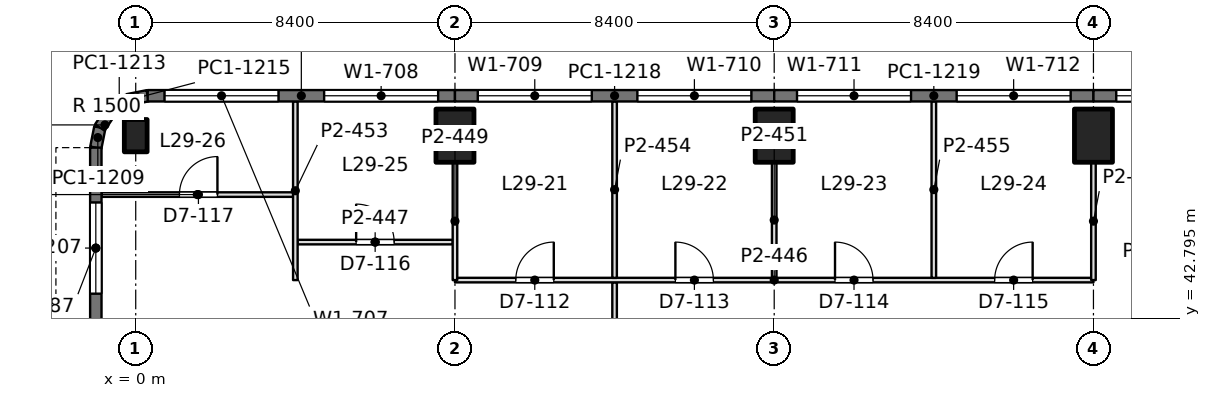
"""IFC4 building model, lengths in metres.
Left out: names, types, materials, properties, quantities, classifications, styles, units other than length and angle.
Written with IfcOpenShell. Run it as: python <this file> out.ifc"""

import sys

from ifc_helpers import new_model, si_unit, direction, frame, frame_2d, origin, origin_2d, place, context, subcontext, project, spatial, rectangle, extrude, element, fill, save


model = new_model("IFC4")
c1 = context("Model", 3, precision=1e-05, world=origin(), true_north=direction((0.0, 1.0)))
c2 = subcontext(c1, "Body", "Model", "MODEL_VIEW")
j1 = project(units=[si_unit("LENGTHUNIT", "METRE"), si_unit("PLANEANGLEUNIT", "RADIAN")], contexts=[c1])
p1 = place(None, origin())
s1 = spatial("IfcSite", under=j1, at=p1, CompositionType="ELEMENT")
p2 = place(p1, origin())
s2 = spatial("IfcBuilding", under=s1, at=p2, CompositionType="ELEMENT")
p3 = place(p2, frame((0.0, 0.0, 130.2)))
s3 = spatial("IfcBuildingStorey", under=s2, at=p3, CompositionType="ELEMENT", Elevation=130.2)
p4 = place(p3, frame((0.0, 47.6, 0.0), z_axis=(0.0, 0.0, 1.0), x_axis=(1.0, 0.0, 0.0)))
e1 = element("IfcColumn", 1, at=p4, inside=s3, PredefinedType="COLUMN", context=c2, shape_type="SweptSolid", body=[
    extrude(rectangle(XDim=0.6, YDim=0.85, at=origin_2d()), origin(), (0.0, 0.0, 1.0), 4.2),
])
for number, where, z_axis, x_axis in (
    (2, (8.4, 47.6, 0.0), (0.0, 0.0, 1.0), (1.0, 0.0, 0.0)),
    (3, (16.8, 47.6, 0.0), (0.0, 0.0, 1.0), (1.0, 0.0, 0.0)),
    (4, (25.2, 47.6, 0.0), (0.0, 0.0, 1.0), (1.0, 0.0, 0.0)),
):
    element("IfcColumn", number, at=place(p3, frame(where, z_axis=z_axis, x_axis=x_axis)), inside=s3, PredefinedType="COLUMN", context=c2, shape_type="SweptSolid", body=[
        extrude(rectangle(XDim=1.0, YDim=1.4, at=origin_2d()), origin(), (0.0, 0.0, 1.0), 4.2),
    ])
p5 = place(p3, frame((-1.05, 42.0, 0.0), z_axis=(0.0, 0.0, 1.0), x_axis=(0.0, 1.0, 0.0)))
e5 = element("IfcWall", 5, at=p5, inside=s3, PredefinedType="SOLIDWALL", context=c2, shape_type="SweptSolid", body=[
    extrude(rectangle(XDim=5.285, YDim=0.3, at=frame_2d((2.643, 0.0))), origin(), (0.0, 0.0, 1.0), 4.05),
])
p6 = place(p5, frame((1.443, 0.0, 0.9)))
e6 = element("IfcOpeningElement", 6, at=p6, cuts=e5, PredefinedType="OPENING", context=c2, shape_type="SweptSolid", body=[
    extrude(rectangle(XDim=2.4, YDim=1.9, at=frame_2d((1.2, 0.95))), frame((0.0, 0.16, 0.0), z_axis=(0.0, -1.0, 0.0), x_axis=(1.0, 0.0, 0.0)), (0.0, 0.0, 1.0), 0.32),
])
p7 = place(p3, frame((-1.05, 47.285, 0.0), z_axis=(0.0, 0.0, 1.0), x_axis=(0.195073962632, 0.980788534345, 0.0)))
e7 = element("IfcWall", 7, at=p7, inside=s3, PredefinedType="SOLIDWALL", context=c2, shape_type="SweptSolid", body=[
    extrude(rectangle(XDim=0.541, YDim=0.3, at=frame_2d((0.271, 0.0))), origin(), (0.0, 0.0, 1.0), 4.05),
])
p8 = place(p3, frame((-0.945, 47.815, 0.0), z_axis=(0.0, 0.0, 1.0), x_axis=(0.55534295404, 0.831621430339, 0.0)))
e8 = element("IfcWall", 8, at=p8, inside=s3, PredefinedType="SOLIDWALL", context=c2, shape_type="SweptSolid", body=[
    extrude(rectangle(XDim=0.526, YDim=0.3, at=frame_2d((0.263, 0.0))), origin(), (0.0, 0.0, 1.0), 4.05),
])
p9 = place(p3, frame((-0.653, 48.253, 0.0), z_axis=(0.0, 0.0, 1.0), x_axis=(0.831692711774, 0.555236195849, 0.0)))
e9 = element("IfcWall", 9, at=p9, inside=s3, PredefinedType="SOLIDWALL", context=c2, shape_type="SweptSolid", body=[
    extrude(rectangle(XDim=0.525, YDim=0.3, at=frame_2d((0.263, 0.0))), origin(), (0.0, 0.0, 1.0), 4.05),
])
p10 = place(p3, frame((-0.216, 48.544, 0.0), z_axis=(0.0, 0.0, 1.0), x_axis=(0.980788534345, 0.195073962632, 0.0)))
e10 = element("IfcWall", 10, at=p10, inside=s3, PredefinedType="SOLIDWALL", context=c2, shape_type="SweptSolid", body=[
    extrude(rectangle(XDim=0.541, YDim=0.3, at=frame_2d((0.271, 0.0))), origin(), (0.0, 0.0, 1.0), 4.05),
])
p11 = place(p3, frame((0.315, 48.65, 0.0), z_axis=(0.0, 0.0, 1.0), x_axis=(1.0, 0.0, 0.0)))
e11 = element("IfcWall", 11, at=p11, inside=s3, PredefinedType="SOLIDWALL", context=c2, shape_type="SweptSolid", body=[
    extrude(rectangle(XDim=8.085, YDim=0.3, at=frame_2d((4.042, 0.0))), origin(), (0.0, 0.0, 1.0), 4.05),
])
p12 = place(p11, frame((0.443, 0.0, 0.9)))
e12 = element("IfcOpeningElement", 12, at=p12, cuts=e11, PredefinedType="OPENING", context=c2, shape_type="SweptSolid", body=[
    extrude(rectangle(XDim=3.0, YDim=1.9, at=frame_2d((1.5, 0.95))), frame((0.0, 0.16, 0.0), z_axis=(0.0, -1.0, 0.0), x_axis=(1.0, 0.0, 0.0)), (0.0, 0.0, 1.0), 0.32),
])
p13 = place(p11, frame((4.643, 0.0, 0.9)))
e13 = element("IfcOpeningElement", 13, at=p13, cuts=e11, PredefinedType="OPENING", context=c2, shape_type="SweptSolid", body=[
    extrude(rectangle(XDim=3.0, YDim=1.9, at=frame_2d((1.5, 0.95))), frame((0.0, 0.16, 0.0), z_axis=(0.0, -1.0, 0.0), x_axis=(1.0, 0.0, 0.0)), (0.0, 0.0, 1.0), 0.32),
])
p14 = place(p3, frame((8.4, 48.65, 0.0), z_axis=(0.0, 0.0, 1.0), x_axis=(1.0, 0.0, 0.0)))
e14 = element("IfcWall", 14, at=p14, inside=s3, PredefinedType="SOLIDWALL", context=c2, shape_type="SweptSolid", body=[
    extrude(rectangle(XDim=8.4, YDim=0.3, at=frame_2d((4.2, 0.0))), origin(), (0.0, 0.0, 1.0), 4.05),
])
p15 = place(p14, frame((0.6, 0.0, 0.9)))
e15 = element("IfcOpeningElement", 15, at=p15, cuts=e14, PredefinedType="OPENING", context=c2, shape_type="SweptSolid", body=[
    extrude(rectangle(XDim=3.0, YDim=1.9, at=frame_2d((1.5, 0.95))), frame((0.0, 0.16, 0.0), z_axis=(0.0, -1.0, 0.0), x_axis=(1.0, 0.0, 0.0)), (0.0, 0.0, 1.0), 0.32),
])
p16 = place(p14, frame((4.8, 0.0, 0.9)))
e16 = element("IfcOpeningElement", 16, at=p16, cuts=e14, PredefinedType="OPENING", context=c2, shape_type="SweptSolid", body=[
    extrude(rectangle(XDim=3.0, YDim=1.9, at=frame_2d((1.5, 0.95))), frame((0.0, 0.16, 0.0), z_axis=(0.0, -1.0, 0.0), x_axis=(1.0, 0.0, 0.0)), (0.0, 0.0, 1.0), 0.32),
])
p17 = place(p3, frame((16.8, 48.65, 0.0), z_axis=(0.0, 0.0, 1.0), x_axis=(1.0, 0.0, 0.0)))
e17 = element("IfcWall", 17, at=p17, inside=s3, PredefinedType="SOLIDWALL", context=c2, shape_type="SweptSolid", body=[
    extrude(rectangle(XDim=8.4, YDim=0.3, at=frame_2d((4.2, 0.0))), origin(), (0.0, 0.0, 1.0), 4.05),
])
p18 = place(p17, frame((0.6, 0.0, 0.9)))
e18 = element("IfcOpeningElement", 18, at=p18, cuts=e17, PredefinedType="OPENING", context=c2, shape_type="SweptSolid", body=[
    extrude(rectangle(XDim=3.0, YDim=1.9, at=frame_2d((1.5, 0.95))), frame((0.0, 0.16, 0.0), z_axis=(0.0, -1.0, 0.0), x_axis=(1.0, 0.0, 0.0)), (0.0, 0.0, 1.0), 0.32),
])
p19 = place(p17, frame((4.8, 0.0, 0.9)))
e19 = element("IfcOpeningElement", 19, at=p19, cuts=e17, PredefinedType="OPENING", context=c2, shape_type="SweptSolid", body=[
    extrude(rectangle(XDim=3.0, YDim=1.9, at=frame_2d((1.5, 0.95))), frame((0.0, 0.16, 0.0), z_axis=(0.0, -1.0, 0.0), x_axis=(1.0, 0.0, 0.0)), (0.0, 0.0, 1.0), 0.32),
])
p20 = place(p3, frame((25.2, 48.65, 0.0), z_axis=(0.0, 0.0, 1.0), x_axis=(1.0, 0.0, 0.0)))
e20 = element("IfcWall", 20, at=p20, inside=s3, PredefinedType="SOLIDWALL", context=c2, shape_type="SweptSolid", body=[
    extrude(rectangle(XDim=8.4, YDim=0.3, at=frame_2d((4.2, 0.0))), origin(), (0.0, 0.0, 1.0), 4.05),
])
p21 = place(p20, frame((0.6, 0.0, 0.9)))
e21 = element("IfcOpeningElement", 21, at=p21, cuts=e20, PredefinedType="OPENING", context=c2, shape_type="SweptSolid", body=[
    extrude(rectangle(XDim=3.0, YDim=1.9, at=frame_2d((1.5, 0.95))), frame((0.0, 0.16, 0.0), z_axis=(0.0, -1.0, 0.0), x_axis=(1.0, 0.0, 0.0)), (0.0, 0.0, 1.0), 0.32),
])
p22 = place(p20, frame((4.8, 0.0, 0.9)))
e22 = element("IfcOpeningElement", 22, at=p22, cuts=e20, PredefinedType="OPENING", context=c2, shape_type="SweptSolid", body=[
    extrude(rectangle(XDim=3.0, YDim=1.9, at=frame_2d((1.5, 0.95))), frame((0.0, 0.16, 0.0), z_axis=(0.0, -1.0, 0.0), x_axis=(1.0, 0.0, 0.0)), (0.0, 0.0, 1.0), 0.32),
])
p23 = place(p3, frame((-0.902, 46.05, 0.0), z_axis=(0.0, 0.0, 1.0), x_axis=(1.0, 0.0, 0.0)))
e23 = element("IfcWall", 23, at=p23, inside=s3, PredefinedType="PARTITIONING", context=c2, shape_type="SweptSolid", body=[
    extrude(rectangle(XDim=5.044, YDim=0.12, at=frame_2d((2.522, 0.0))), origin(), (0.0, 0.0, 1.0), 3.56),
])
p24 = place(p23, frame((2.052, 0.0, 0.0)))
e24 = element("IfcOpeningElement", 24, at=p24, cuts=e23, PredefinedType="OPENING", context=c2, shape_type="SweptSolid", body=[
    extrude(rectangle(XDim=1.0, YDim=2.4, at=frame_2d((0.5, 1.2))), frame((0.0, 0.07, 0.0), z_axis=(0.0, -1.0, 0.0), x_axis=(1.0, 0.0, 0.0)), (0.0, 0.0, 1.0), 0.14),
])
p25 = place(p3, frame((4.258, 44.8, 0.0), z_axis=(0.0, 0.0, 1.0), x_axis=(1.0, 0.0, 0.0)))
e25 = element("IfcWall", 25, at=p25, inside=s3, PredefinedType="PARTITIONING", context=c2, shape_type="SweptSolid", body=[
    extrude(rectangle(XDim=4.084, YDim=0.12, at=frame_2d((2.042, 0.0))), origin(), (0.0, 0.0, 1.0), 3.55),
])
p26 = place(p25, frame((1.542, 0.0, 0.0)))
e26 = element("IfcOpeningElement", 26, at=p26, cuts=e25, PredefinedType="OPENING", context=c2, shape_type="SweptSolid", body=[
    extrude(rectangle(XDim=1.0, YDim=2.4, at=frame_2d((0.5, 1.2))), frame((0.0, 0.07, 0.0), z_axis=(0.0, -1.0, 0.0), x_axis=(1.0, 0.0, 0.0)), (0.0, 0.0, 1.0), 0.14),
])
p27 = place(p3, frame((8.4, 43.8, 0.0), z_axis=(0.0, 0.0, 1.0), x_axis=(1.0, 0.0, 0.0)))
e27 = element("IfcWall", 27, at=p27, inside=s3, PredefinedType="PARTITIONING", context=c2, shape_type="SweptSolid", body=[
    extrude(rectangle(XDim=16.8, YDim=0.12, at=frame_2d((8.4, 0.0))), origin(), (0.0, 0.0, 1.0), 3.55),
])
p28 = place(p27, frame((1.6, 0.0, 0.0)))
e28 = element("IfcOpeningElement", 28, at=p28, cuts=e27, PredefinedType="OPENING", context=c2, shape_type="SweptSolid", body=[
    extrude(rectangle(XDim=1.0, YDim=2.4, at=frame_2d((0.5, 1.2))), frame((0.0, 0.07, 0.0), z_axis=(0.0, -1.0, 0.0), x_axis=(1.0, 0.0, 0.0)), (0.0, 0.0, 1.0), 0.14),
])
p29 = place(p27, frame((5.8, 0.0, 0.0)))
e29 = element("IfcOpeningElement", 29, at=p29, cuts=e27, PredefinedType="OPENING", context=c2, shape_type="SweptSolid", body=[
    extrude(rectangle(XDim=1.0, YDim=2.4, at=frame_2d((0.5, 1.2))), frame((0.0, 0.07, 0.0), z_axis=(0.0, -1.0, 0.0), x_axis=(1.0, 0.0, 0.0)), (0.0, 0.0, 1.0), 0.14),
])
p30 = place(p27, frame((10.0, 0.0, 0.0)))
e30 = element("IfcOpeningElement", 30, at=p30, cuts=e27, PredefinedType="OPENING", context=c2, shape_type="SweptSolid", body=[
    extrude(rectangle(XDim=1.0, YDim=2.4, at=frame_2d((0.5, 1.2))), frame((0.0, 0.07, 0.0), z_axis=(0.0, -1.0, 0.0), x_axis=(1.0, 0.0, 0.0)), (0.0, 0.0, 1.0), 0.14),
])
p31 = place(p27, frame((14.2, 0.0, 0.0)))
e31 = element("IfcOpeningElement", 31, at=p31, cuts=e27, PredefinedType="OPENING", context=c2, shape_type="SweptSolid", body=[
    extrude(rectangle(XDim=1.0, YDim=2.4, at=frame_2d((0.5, 1.2))), frame((0.0, 0.07, 0.0), z_axis=(0.0, -1.0, 0.0), x_axis=(1.0, 0.0, 0.0)), (0.0, 0.0, 1.0), 0.14),
])
p32 = place(p3, frame((4.2, 43.8, 0.0), z_axis=(0.0, 0.0, 1.0), x_axis=(0.0, 1.0, 0.0)))
e32 = element("IfcWall", 32, at=p32, inside=s3, PredefinedType="PARTITIONING", context=c2, shape_type="SweptSolid", body=[
    extrude(rectangle(XDim=4.702, YDim=0.12, at=frame_2d((2.351, 0.0))), origin(), (0.0, 0.0, 1.0), 3.56),
])
p33 = place(p3, frame((8.4, 43.8, 0.0), z_axis=(0.0, 0.0, 1.0), x_axis=(0.0, 1.0, 0.0)))
e33 = element("IfcWall", 33, at=p33, inside=s3, PredefinedType="PARTITIONING", context=c2, shape_type="SweptSolid", body=[
    extrude(rectangle(XDim=3.101, YDim=0.12, at=frame_2d((1.55, 0.0))), origin(), (0.0, 0.0, 1.0), 3.55),
])
p34 = place(p3, frame((12.6, 43.858, 0.0), z_axis=(0.0, 0.0, 1.0), x_axis=(0.0, 1.0, 0.0)))
e34 = element("IfcWall", 34, at=p34, inside=s3, PredefinedType="PARTITIONING", context=c2, shape_type="SweptSolid", body=[
    extrude(rectangle(XDim=4.644, YDim=0.12, at=frame_2d((2.322, 0.0))), origin(), (0.0, 0.0, 1.0), 3.56),
])
p35 = place(p3, frame((16.8, 43.858, 0.0), z_axis=(0.0, 0.0, 1.0), x_axis=(0.0, 1.0, 0.0)))
e35 = element("IfcWall", 35, at=p35, inside=s3, PredefinedType="PARTITIONING", context=c2, shape_type="SweptSolid", body=[
    extrude(rectangle(XDim=3.043, YDim=0.12, at=frame_2d((1.521, 0.0))), origin(), (0.0, 0.0, 1.0), 3.55),
])
p36 = place(p3, frame((21.0, 43.858, 0.0), z_axis=(0.0, 0.0, 1.0), x_axis=(0.0, 1.0, 0.0)))
e36 = element("IfcWall", 36, at=p36, inside=s3, PredefinedType="PARTITIONING", context=c2, shape_type="SweptSolid", body=[
    extrude(rectangle(XDim=4.644, YDim=0.12, at=frame_2d((2.322, 0.0))), origin(), (0.0, 0.0, 1.0), 3.56),
])
p37 = place(p3, frame((25.2, 43.8, 0.0), z_axis=(0.0, 0.0, 1.0), x_axis=(0.0, 1.0, 0.0)))
e37 = element("IfcWall", 37, at=p37, inside=s3, PredefinedType="PARTITIONING", context=c2, shape_type="SweptSolid", body=[
    extrude(rectangle(XDim=3.101, YDim=0.12, at=frame_2d((1.55, 0.0))), origin(), (0.0, 0.0, 1.0), 3.55),
])
p38 = place(p3, frame((12.6, 39.858, 0.0), z_axis=(0.0, 0.0, 1.0), x_axis=(0.0, 1.0, 0.0)))
e38 = element("IfcWall", 38, at=p38, inside=s3, PredefinedType="PARTITIONING", context=c2, shape_type="SweptSolid", body=[
    extrude(rectangle(XDim=3.884, YDim=0.12, at=frame_2d((1.942, 0.0))), origin(), (0.0, 0.0, 1.0), 3.55),
])
p39 = place(p6, origin())
e39 = element("IfcWindow", 39, at=p39, inside=s3, PartitioningType="SINGLE_PANEL", PredefinedType="WINDOW", context=c2, shape_type="SweptSolid", body=[
    extrude(rectangle(XDim=2.4, YDim=1.9, at=frame_2d((1.2, 0.95))), frame((0.0, 0.03, 0.0), z_axis=(0.0, -1.0, 0.0), x_axis=(1.0, 0.0, 0.0)), (0.0, 0.0, 1.0), 0.06),
])
fill(e6, e39)
p40 = place(p12, origin())
e40 = element("IfcWindow", 40, at=p40, inside=s3, PartitioningType="SINGLE_PANEL", PredefinedType="WINDOW", context=c2, shape_type="SweptSolid", body=[
    extrude(rectangle(XDim=3.0, YDim=1.9, at=frame_2d((1.5, 0.95))), frame((0.0, 0.03, 0.0), z_axis=(0.0, -1.0, 0.0), x_axis=(1.0, 0.0, 0.0)), (0.0, 0.0, 1.0), 0.06),
])
fill(e12, e40)
p41 = place(p13, origin())
e41 = element("IfcWindow", 41, at=p41, inside=s3, PartitioningType="SINGLE_PANEL", PredefinedType="WINDOW", context=c2, shape_type="SweptSolid", body=[
    extrude(rectangle(XDim=3.0, YDim=1.9, at=frame_2d((1.5, 0.95))), frame((0.0, 0.03, 0.0), z_axis=(0.0, -1.0, 0.0), x_axis=(1.0, 0.0, 0.0)), (0.0, 0.0, 1.0), 0.06),
])
fill(e13, e41)
p42 = place(p15, origin())
e42 = element("IfcWindow", 42, at=p42, inside=s3, PartitioningType="SINGLE_PANEL", PredefinedType="WINDOW", context=c2, shape_type="SweptSolid", body=[
    extrude(rectangle(XDim=3.0, YDim=1.9, at=frame_2d((1.5, 0.95))), frame((0.0, 0.03, 0.0), z_axis=(0.0, -1.0, 0.0), x_axis=(1.0, 0.0, 0.0)), (0.0, 0.0, 1.0), 0.06),
])
fill(e15, e42)
p43 = place(p16, origin())
e43 = element("IfcWindow", 43, at=p43, inside=s3, PartitioningType="SINGLE_PANEL", PredefinedType="WINDOW", context=c2, shape_type="SweptSolid", body=[
    extrude(rectangle(XDim=3.0, YDim=1.9, at=frame_2d((1.5, 0.95))), frame((0.0, 0.03, 0.0), z_axis=(0.0, -1.0, 0.0), x_axis=(1.0, 0.0, 0.0)), (0.0, 0.0, 1.0), 0.06),
])
fill(e16, e43)
p44 = place(p18, origin())
e44 = element("IfcWindow", 44, at=p44, inside=s3, PartitioningType="SINGLE_PANEL", PredefinedType="WINDOW", context=c2, shape_type="SweptSolid", body=[
    extrude(rectangle(XDim=3.0, YDim=1.9, at=frame_2d((1.5, 0.95))), frame((0.0, 0.03, 0.0), z_axis=(0.0, -1.0, 0.0), x_axis=(1.0, 0.0, 0.0)), (0.0, 0.0, 1.0), 0.06),
])
fill(e18, e44)
p45 = place(p19, origin())
e45 = element("IfcWindow", 45, at=p45, inside=s3, PartitioningType="SINGLE_PANEL", PredefinedType="WINDOW", context=c2, shape_type="SweptSolid", body=[
    extrude(rectangle(XDim=3.0, YDim=1.9, at=frame_2d((1.5, 0.95))), frame((0.0, 0.03, 0.0), z_axis=(0.0, -1.0, 0.0), x_axis=(1.0, 0.0, 0.0)), (0.0, 0.0, 1.0), 0.06),
])
fill(e19, e45)
p46 = place(p21, origin())
e46 = element("IfcWindow", 46, at=p46, inside=s3, PartitioningType="SINGLE_PANEL", PredefinedType="WINDOW", context=c2, shape_type="SweptSolid", body=[
    extrude(rectangle(XDim=3.0, YDim=1.9, at=frame_2d((1.5, 0.95))), frame((0.0, 0.03, 0.0), z_axis=(0.0, -1.0, 0.0), x_axis=(1.0, 0.0, 0.0)), (0.0, 0.0, 1.0), 0.06),
])
fill(e21, e46)
p47 = place(p24, origin())
e47 = element("IfcDoor", 47, at=p47, inside=s3, OperationType="SINGLE_SWING_RIGHT", PredefinedType="DOOR", context=c2, shape_type="SweptSolid", body=[
    extrude(rectangle(XDim=1.0, YDim=2.4, at=frame_2d((0.5, 1.2))), frame((0.0, 0.025, 0.0), z_axis=(0.0, -1.0, 0.0), x_axis=(1.0, 0.0, 0.0)), (0.0, 0.0, 1.0), 0.05),
])
fill(e24, e47)
p48 = place(p26, origin())
e48 = element("IfcDoor", 48, at=p48, inside=s3, OperationType="SINGLE_SWING_LEFT", PredefinedType="DOOR", context=c2, shape_type="SweptSolid", body=[
    extrude(rectangle(XDim=1.0, YDim=2.4, at=frame_2d((0.5, 1.2))), frame((0.0, 0.025, 0.0), z_axis=(0.0, -1.0, 0.0), x_axis=(1.0, 0.0, 0.0)), (0.0, 0.0, 1.0), 0.05),
])
fill(e26, e48)
p49 = place(p28, origin())
e49 = element("IfcDoor", 49, at=p49, inside=s3, OperationType="SINGLE_SWING_RIGHT", PredefinedType="DOOR", context=c2, shape_type="SweptSolid", body=[
    extrude(rectangle(XDim=1.0, YDim=2.4, at=frame_2d((0.5, 1.2))), frame((0.0, 0.025, 0.0), z_axis=(0.0, -1.0, 0.0), x_axis=(1.0, 0.0, 0.0)), (0.0, 0.0, 1.0), 0.05),
])
fill(e28, e49)
p50 = place(p29, origin())
e50 = element("IfcDoor", 50, at=p50, inside=s3, OperationType="SINGLE_SWING_LEFT", PredefinedType="DOOR", context=c2, shape_type="SweptSolid", body=[
    extrude(rectangle(XDim=1.0, YDim=2.4, at=frame_2d((0.5, 1.2))), frame((0.0, 0.025, 0.0), z_axis=(0.0, -1.0, 0.0), x_axis=(1.0, 0.0, 0.0)), (0.0, 0.0, 1.0), 0.05),
])
fill(e29, e50)
p51 = place(p30, origin())
e51 = element("IfcDoor", 51, at=p51, inside=s3, OperationType="SINGLE_SWING_LEFT", PredefinedType="DOOR", context=c2, shape_type="SweptSolid", body=[
    extrude(rectangle(XDim=1.0, YDim=2.4, at=frame_2d((0.5, 1.2))), frame((0.0, 0.025, 0.0), z_axis=(0.0, -1.0, 0.0), x_axis=(1.0, 0.0, 0.0)), (0.0, 0.0, 1.0), 0.05),
])
fill(e30, e51)
p52 = place(p31, origin())
e52 = element("IfcDoor", 52, at=p52, inside=s3, OperationType="SINGLE_SWING_RIGHT", PredefinedType="DOOR", context=c2, shape_type="SweptSolid", body=[
    extrude(rectangle(XDim=1.0, YDim=2.4, at=frame_2d((0.5, 1.2))), frame((0.0, 0.025, 0.0), z_axis=(0.0, -1.0, 0.0), x_axis=(1.0, 0.0, 0.0)), (0.0, 0.0, 1.0), 0.05),
])
fill(e31, e52)
save(model, sys.argv[1])
